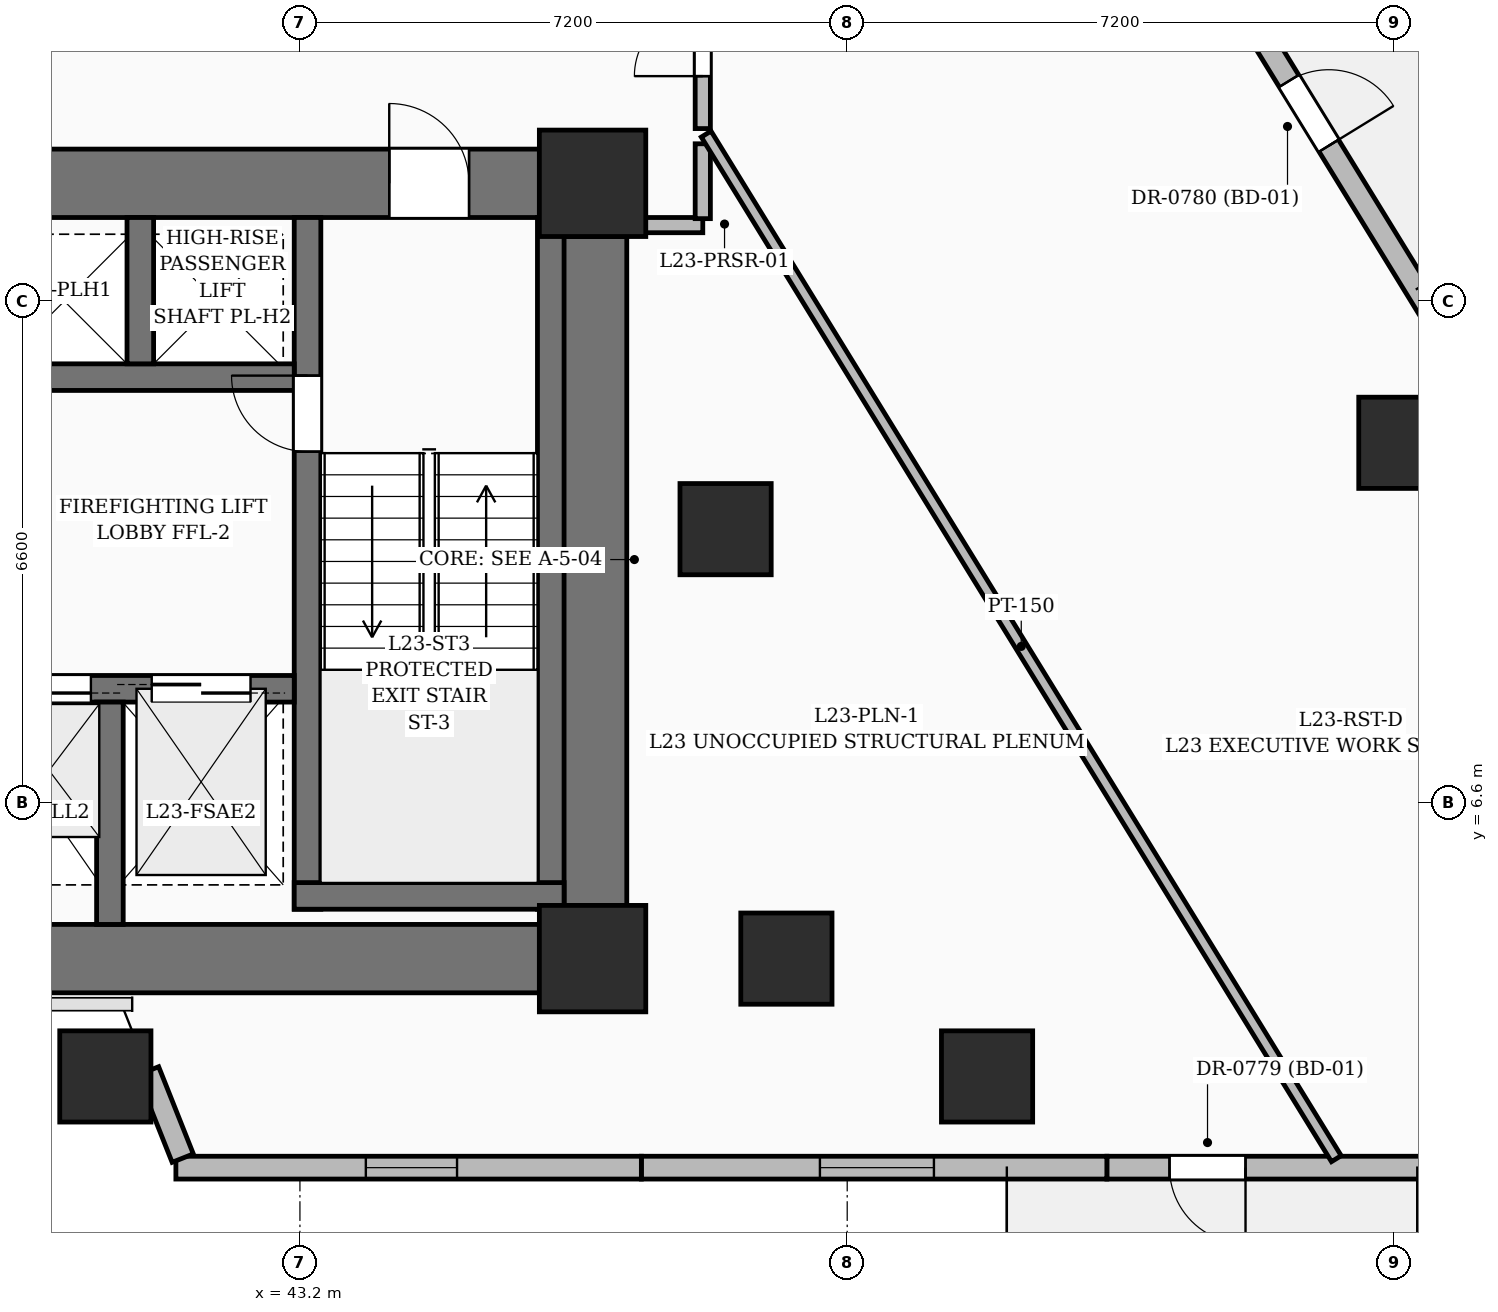
"""IFC4 building model, lengths in metres.
Left out: names, types, materials, properties, quantities, classifications, styles, units other than length and angle.
Written with IfcOpenShell. Run it as: python <this file> out.ifc"""

import sys

from ifc_helpers import new_model, si_unit, direction, frame, frame_2d, origin, origin_2d, place, context, subcontext, project, spatial, rectangle, extrude, element, fill, save


model = new_model("IFC4")
c1 = context("Model", 3, precision=1e-05, world=origin(), true_north=direction((0.0, 1.0)))
c2 = subcontext(c1, "Body", "Model", "MODEL_VIEW")
j1 = project(units=[si_unit("LENGTHUNIT", "METRE"), si_unit("PLANEANGLEUNIT", "RADIAN")], contexts=[c1])
p1 = place(None, origin())
s1 = spatial("IfcSite", under=j1, at=p1, CompositionType="ELEMENT")
p2 = place(p1, origin())
s2 = spatial("IfcBuilding", under=s1, at=p2, CompositionType="ELEMENT")
p3 = place(p2, frame((0.0, 0.0, 93.0)))
s3 = spatial("IfcBuildingStorey", under=s2, at=p3, CompositionType="ELEMENT", Elevation=93.0)
for number, where, z_axis, x_axis in (
    (1, (47.05, 4.55, 0.0), (0.0, 0.0, 1.0), (1.0, 0.0, 0.0)),
    (2, (47.05, 14.75, 0.0), (0.0, 0.0, 1.0), (1.0, 0.0, 0.0)),
):
    element("IfcColumn", number, at=place(p3, frame(where, z_axis=z_axis, x_axis=x_axis)), inside=s3, PredefinedType="COLUMN", context=c2, shape_type="SweptSolid", body=[
        extrude(rectangle(XDim=1.4, YDim=1.4, at=origin_2d()), origin(), (0.0, 0.0, 1.0), 3.6),
    ])
for number, where, z_axis, x_axis in (
    (3, (49.6, 4.55, 0.0), (0.0, 0.0, 1.0), (1.0, 0.0, 0.0)),
    (4, (48.8, 10.2, 0.0), (0.0, 0.0, 1.0), (1.0, 0.0, 0.0)),
):
    element("IfcColumn", number, at=place(p3, frame(where, z_axis=z_axis, x_axis=x_axis)), inside=s3, PredefinedType="COLUMN", context=c2, shape_type="SweptSolid", body=[
        extrude(rectangle(XDim=1.2, YDim=1.2, at=origin_2d()), origin(), (0.0, 0.0, 1.0), 3.6),
    ])
p4 = place(p3, frame((35.85, 4.55, 0.0), z_axis=(0.0, 0.0, 1.0), x_axis=(1.0, 0.0, 0.0)))
e5 = element("IfcWall", 5, at=p4, inside=s3, PredefinedType="SHEAR", context=c2, shape_type="SweptSolid", body=[
    extrude(rectangle(XDim=10.5, YDim=0.9, at=frame_2d((5.25, 0.0))), origin(), (0.0, 0.0, 1.0), 3.6),
])
p5 = place(p3, frame((35.85, 14.75, 0.0), z_axis=(0.0, 0.0, 1.0), x_axis=(1.0, 0.0, 0.0)))
e6 = element("IfcWall", 6, at=p5, inside=s3, PredefinedType="SHEAR", context=c2, shape_type="SweptSolid", body=[
    extrude(rectangle(XDim=10.5, YDim=0.9, at=frame_2d((5.25, 0.0))), origin(), (0.0, 0.0, 1.0), 3.6),
])
p6 = place(p5, frame((0.925, 0.0, 0.0)))
e7 = element("IfcOpeningElement", 7, at=p6, cuts=e6, PredefinedType="OPENING", context=c2, shape_type="SweptSolid", body=[
    extrude(rectangle(XDim=1.05, YDim=2.15, at=frame_2d((0.525, 1.075))), frame((0.0, 0.46, 0.0), z_axis=(0.0, -1.0, 0.0), x_axis=(1.0, 0.0, 0.0)), (0.0, 0.0, 1.0), 0.92),
])
p7 = place(p5, frame((8.525, 0.0, 0.0)))
e8 = element("IfcOpeningElement", 8, at=p7, cuts=e6, PredefinedType="OPENING", context=c2, shape_type="SweptSolid", body=[
    extrude(rectangle(XDim=1.05, YDim=2.15, at=frame_2d((0.525, 1.075))), frame((0.0, 0.46, 0.0), z_axis=(0.0, -1.0, 0.0), x_axis=(1.0, 0.0, 0.0)), (0.0, 0.0, 1.0), 0.92),
])
p8 = place(p3, frame((47.05, 5.25, 0.0), z_axis=(0.0, 0.0, 1.0), x_axis=(0.0, 1.0, 0.0)))
e9 = element("IfcWall", 9, at=p8, inside=s3, PredefinedType="SHEAR", context=c2, shape_type="SweptSolid", body=[
    extrude(rectangle(XDim=8.8, YDim=0.9, at=frame_2d((4.4, 0.0))), origin(), (0.0, 0.0, 1.0), 3.6),
])
p9 = place(p3, frame((43.3, 5.2, 0.0), z_axis=(0.0, 0.0, 1.0), x_axis=(0.0, 1.0, 0.0)))
e10 = element("IfcWall", 10, at=p9, inside=s3, PredefinedType="SOLIDWALL", context=c2, shape_type="SweptSolid", body=[
    extrude(rectangle(XDim=9.1, YDim=0.35, at=frame_2d((4.55, 0.0))), origin(), (0.0, 0.0, 1.0), 3.6),
])
p10 = place(p9, frame((6.02, 0.0, 0.0)))
e11 = element("IfcOpeningElement", 11, at=p10, cuts=e10, PredefinedType="OPENING", context=c2, shape_type="SweptSolid", body=[
    extrude(rectangle(XDim=1.0, YDim=2.15, at=frame_2d((0.5, 1.075))), frame((0.0, 0.185, 0.0), z_axis=(0.0, -1.0, 0.0), x_axis=(1.0, 0.0, 0.0)), (0.0, 0.0, 1.0), 0.37),
])
p11 = place(p3, frame((46.5, 5.2, 0.0), z_axis=(0.0, 0.0, 1.0), x_axis=(0.0, 1.0, 0.0)))
e12 = element("IfcWall", 12, at=p11, inside=s3, PredefinedType="SOLIDWALL", context=c2, shape_type="SweptSolid", body=[
    extrude(rectangle(XDim=9.1, YDim=0.35, at=frame_2d((4.55, 0.0))), origin(), (0.0, 0.0, 1.0), 3.6),
])
p12 = place(p3, frame((43.125, 5.375, 0.0), z_axis=(0.0, 0.0, 1.0), x_axis=(1.0, 0.0, 0.0)))
e13 = element("IfcWall", 13, at=p12, inside=s3, PredefinedType="SOLIDWALL", context=c2, shape_type="SweptSolid", body=[
    extrude(rectangle(XDim=3.55, YDim=0.35, at=frame_2d((1.775, 0.0))), origin(), (0.0, 0.0, 1.0), 3.6),
])
p13 = place(p3, frame((39.075, 8.1, 0.0), z_axis=(0.0, 0.0, 1.0), x_axis=(1.0, 0.0, 0.0)))
e14 = element("IfcWall", 14, at=p13, inside=s3, PredefinedType="SOLIDWALL", context=c2, shape_type="SweptSolid", body=[
    extrude(rectangle(XDim=4.05, YDim=0.35, at=frame_2d((2.025, 0.0))), origin(), (0.0, 0.0, 1.0), 3.6),
])
p14 = place(p13, frame((2.175, 0.0, 0.0)))
e15 = element("IfcOpeningElement", 15, at=p14, cuts=e14, PredefinedType="OPENING", context=c2, shape_type="SweptSolid", body=[
    extrude(rectangle(XDim=1.3, YDim=2.25, at=frame_2d((0.65, 1.125))), frame((0.0, 0.185, 0.0), z_axis=(0.0, -1.0, 0.0), x_axis=(1.0, 0.0, 0.0)), (0.0, 0.0, 1.0), 0.37),
])
p15 = place(p13, frame((0.275, 0.0, 0.0)))
e16 = element("IfcOpeningElement", 16, at=p15, cuts=e14, PredefinedType="OPENING", context=c2, shape_type="SweptSolid", body=[
    extrude(rectangle(XDim=1.1, YDim=2.2, at=frame_2d((0.55, 1.1))), frame((0.0, 0.185, 0.0), z_axis=(0.0, -1.0, 0.0), x_axis=(1.0, 0.0, 0.0)), (0.0, 0.0, 1.0), 0.37),
])
p16 = place(p3, frame((40.7, 5.0, 0.0), z_axis=(0.0, 0.0, 1.0), x_axis=(0.0, 1.0, 0.0)))
e17 = element("IfcWall", 17, at=p16, inside=s3, PredefinedType="SOLIDWALL", context=c2, shape_type="SweptSolid", body=[
    extrude(rectangle(XDim=2.925, YDim=0.35, at=frame_2d((1.462, 0.0))), origin(), (0.0, 0.0, 1.0), 3.6),
])
p17 = place(p3, frame((39.075, 12.2, 0.0), z_axis=(0.0, 0.0, 1.0), x_axis=(1.0, 0.0, 0.0)))
e18 = element("IfcWall", 18, at=p17, inside=s3, PredefinedType="SOLIDWALL", context=c2, shape_type="SweptSolid", body=[
    extrude(rectangle(XDim=4.05, YDim=0.35, at=frame_2d((2.025, 0.0))), origin(), (0.0, 0.0, 1.0), 3.6),
])
p18 = place(p3, frame((41.1, 12.375, 0.0), z_axis=(0.0, 0.0, 1.0), x_axis=(0.0, 1.0, 0.0)))
e19 = element("IfcWall", 19, at=p18, inside=s3, PredefinedType="SOLIDWALL", context=c2, shape_type="SweptSolid", body=[
    extrude(rectangle(XDim=1.925, YDim=0.35, at=frame_2d((0.962, 0.0))), origin(), (0.0, 0.0, 1.0), 3.6),
])
for number, where, z_axis, x_axis in (
    (20, (40.64, 3.0, 0.0), (0.0, 0.0, 1.0), (1.0, 0.0, 0.0)),
    (21, (52.24, 3.0, 0.0), (0.0, 0.0, 1.0), (1.0, 0.0, 0.0)),
    (22, (57.73, 11.336, 0.0), (0.0, 0.0, 1.0), (1.0, 0.0, 0.0)),
):
    element("IfcColumn", number, at=place(p3, frame(where, z_axis=z_axis, x_axis=x_axis)), inside=s3, PredefinedType="COLUMN", context=c2, shape_type="SweptSolid", body=[
        extrude(rectangle(XDim=1.2, YDim=1.2, at=origin_2d()), origin(), (0.0, 0.0, 1.0), 3.6),
    ])
p19 = place(p3, frame((54.041, 19.629, 0.0), z_axis=(0.0, 0.0, 1.0), x_axis=(0.523661280051, -0.851926560083, 0.0)))
e23 = element("IfcWall", 23, at=p19, inside=s3, PredefinedType="SOLIDWALL", context=c2, shape_type="SweptSolid", body=[
    extrude(rectangle(XDim=7.934, YDim=0.3, at=frame_2d((3.967, 0.0))), origin(), (0.0, 0.0, 1.0), 3.35),
])
p20 = place(p19, frame((4.146, 0.0, 0.0)))
e24 = element("IfcOpeningElement", 24, at=p20, cuts=e23, PredefinedType="OPENING", context=c2, shape_type="SweptSolid", body=[
    extrude(rectangle(XDim=1.0, YDim=2.2, at=frame_2d((0.5, 1.1))), frame((0.0, 0.16, 0.0), z_axis=(0.0, -1.0, 0.0), x_axis=(1.0, 0.0, 0.0)), (0.0, 0.0, 1.0), 0.32),
])
p21 = place(p3, frame((59.34, 1.8, 0.0), z_axis=(0.0, 0.0, 1.0), x_axis=(-1.0, 0.0, 0.0)))
e25 = element("IfcWall", 25, at=p21, inside=s3, PredefinedType="SOLIDWALL", context=c2, shape_type="SweptSolid", body=[
    extrude(rectangle(XDim=5.524, YDim=0.3, at=frame_2d((2.762, 0.0))), origin(), (0.0, 0.0, 1.0), 3.35),
])
p22 = place(p21, frame((3.7, 0.0, 0.0)))
e26 = element("IfcOpeningElement", 26, at=p22, cuts=e25, PredefinedType="OPENING", context=c2, shape_type="SweptSolid", body=[
    extrude(rectangle(XDim=1.0, YDim=2.2, at=frame_2d((0.5, 1.1))), frame((0.0, 0.16, 0.0), z_axis=(0.0, -1.0, 0.0), x_axis=(1.0, 0.0, 0.0)), (0.0, 0.0, 1.0), 0.32),
])
p23 = place(p3, frame((53.816, 1.8, 0.0), z_axis=(0.0, 0.0, 1.0), x_axis=(-1.0, 0.0, 0.0)))
e27 = element("IfcWall", 27, at=p23, inside=s3, PredefinedType="SOLIDWALL", context=c2, shape_type="SweptSolid", body=[
    extrude(rectangle(XDim=6.124, YDim=0.3, at=frame_2d((3.062, 0.0))), origin(), (0.0, 0.0, 1.0), 3.35),
])
p24 = place(p23, frame((2.275, 0.0, 0.6)))
e28 = element("IfcOpeningElement", 28, at=p24, cuts=e27, PredefinedType="OPENING", context=c2, shape_type="SweptSolid", body=[
    extrude(rectangle(XDim=1.5, YDim=2.1, at=frame_2d((0.75, 1.05))), frame((0.0, 0.16, 0.0), z_axis=(0.0, -1.0, 0.0), x_axis=(1.0, 0.0, 0.0)), (0.0, 0.0, 1.0), 0.32),
])
p25 = place(p3, frame((47.692, 1.8, 0.0), z_axis=(0.0, 0.0, 1.0), x_axis=(-1.0, 0.0, 0.0)))
e29 = element("IfcWall", 29, at=p25, inside=s3, PredefinedType="SOLIDWALL", context=c2, shape_type="SweptSolid", body=[
    extrude(rectangle(XDim=6.124, YDim=0.3, at=frame_2d((3.062, 0.0))), origin(), (0.0, 0.0, 1.0), 3.35),
])
p26 = place(p25, frame((2.425, 0.0, 0.8)))
e30 = element("IfcOpeningElement", 30, at=p26, cuts=e29, PredefinedType="OPENING", context=c2, shape_type="SweptSolid", body=[
    extrude(rectangle(XDim=1.2, YDim=1.8, at=frame_2d((0.6, 0.9))), frame((0.0, 0.16, 0.0), z_axis=(0.0, -1.0, 0.0), x_axis=(1.0, 0.0, 0.0)), (0.0, 0.0, 1.0), 0.32),
])
p27 = place(p3, frame((41.658, 1.925, 0.0), z_axis=(0.0, 0.0, 1.0), x_axis=(-0.369583004586, 0.929197719929, 0.0)))
e31 = element("IfcWall", 31, at=p27, inside=s3, PredefinedType="SOLIDWALL", context=c2, shape_type="SweptSolid", body=[
    extrude(rectangle(XDim=1.235, YDim=0.3, at=frame_2d((0.617, 0.0))), origin(), (0.0, 0.0, 1.0), 2.375),
])
p28 = place(p3, frame((47.5, 14.2, 0.0), z_axis=(0.0, 0.0, 1.0), x_axis=(1.0, 0.0, 0.0)))
e32 = element("IfcWall", 32, at=p28, inside=s3, PredefinedType="PARTITIONING", context=c2, shape_type="SweptSolid", body=[
    extrude(rectangle(XDim=1.0, YDim=0.2, at=frame_2d((0.5, 0.0))), origin(), (0.0, 0.0, 1.0), 3.35),
])
p29 = place(p3, frame((48.5, 14.285, 0.0), z_axis=(0.0, 0.0, 1.0), x_axis=(0.0, 1.0, 0.0)))
e33 = element("IfcWall", 33, at=p29, inside=s3, PredefinedType="PARTITIONING", context=c2, shape_type="SweptSolid", body=[
    extrude(rectangle(XDim=0.985, YDim=0.2, at=frame_2d((0.493, 0.0))), origin(), (0.0, 0.0, 1.0), 3.35),
])
p30 = place(p3, frame((48.5, 15.47, 0.0), z_axis=(0.0, 0.0, 1.0), x_axis=(0.0, 1.0, 0.0)))
e34 = element("IfcWall", 34, at=p30, inside=s3, PredefinedType="PARTITIONING", context=c2, shape_type="SweptSolid", body=[
    extrude(rectangle(XDim=2.28, YDim=0.2, at=frame_2d((1.14, 0.0))), origin(), (0.0, 0.0, 1.0), 2.345),
])
p31 = place(p30, frame((0.69, 0.0, 0.0)))
e35 = element("IfcOpeningElement", 35, at=p31, cuts=e34, PredefinedType="OPENING", context=c2, shape_type="SweptSolid", body=[
    extrude(rectangle(XDim=0.9, YDim=2.1, at=frame_2d((0.45, 1.05))), frame((0.0, 0.11, 0.0), z_axis=(0.0, -1.0, 0.0), x_axis=(1.0, 0.0, 0.0)), (0.0, 0.0, 1.0), 0.22),
])
p32 = place(p3, frame((56.835, 1.918, 0.0), z_axis=(0.0, 0.0, 1.0), x_axis=(-0.52387102705, 0.851797597447, 0.0)))
e36 = element("IfcWall", 36, at=p32, inside=s3, PredefinedType="PARTITIONING", context=c2, shape_type="SweptSolid", body=[
    extrude(rectangle(XDim=15.825, YDim=0.15, at=frame_2d((7.913, 0.0))), origin(), (0.0, 0.0, 1.0), 2.345),
])
p33 = place(p20, origin())
e37 = element("IfcDoor", 37, at=p33, inside=s3, OperationType="SINGLE_SWING_RIGHT", PredefinedType="DOOR", context=c2, shape_type="SweptSolid", body=[
    extrude(rectangle(XDim=1.0, YDim=2.2, at=frame_2d((0.5, 1.1))), frame((0.0, 0.025, 0.0), z_axis=(0.0, -1.0, 0.0), x_axis=(1.0, 0.0, 0.0)), (0.0, 0.0, 1.0), 0.05),
])
fill(e24, e37)
p34 = place(p22, origin())
e38 = element("IfcDoor", 38, at=p34, inside=s3, OperationType="SINGLE_SWING_LEFT", PredefinedType="DOOR", context=c2, shape_type="SweptSolid", body=[
    extrude(rectangle(XDim=1.0, YDim=2.2, at=frame_2d((0.5, 1.1))), frame((0.0, 0.025, 0.0), z_axis=(0.0, -1.0, 0.0), x_axis=(1.0, 0.0, 0.0)), (0.0, 0.0, 1.0), 0.05),
])
fill(e26, e38)
p35 = place(p24, origin())
e39 = element("IfcWindow", 39, at=p35, inside=s3, PartitioningType="SINGLE_PANEL", PredefinedType="WINDOW", context=c2, shape_type="SweptSolid", body=[
    extrude(rectangle(XDim=1.5, YDim=2.1, at=frame_2d((0.75, 1.05))), frame((0.0, 0.03, 0.0), z_axis=(0.0, -1.0, 0.0), x_axis=(1.0, 0.0, 0.0)), (0.0, 0.0, 1.0), 0.06),
])
fill(e28, e39)
p36 = place(p26, origin())
e40 = element("IfcWindow", 40, at=p36, inside=s3, PartitioningType="SINGLE_PANEL", PredefinedType="WINDOW", context=c2, shape_type="SweptSolid", body=[
    extrude(rectangle(XDim=1.2, YDim=1.8, at=frame_2d((0.6, 0.9))), frame((0.0, 0.03, 0.0), z_axis=(0.0, -1.0, 0.0), x_axis=(1.0, 0.0, 0.0)), (0.0, 0.0, 1.0), 0.06),
])
fill(e30, e40)
p37 = place(p7, origin())
e41 = element("IfcDoor", 41, at=p37, inside=s3, OperationType="SINGLE_SWING_LEFT", PredefinedType="DOOR", context=c2, shape_type="SweptSolid", body=[
    extrude(rectangle(XDim=1.05, YDim=2.15, at=frame_2d((0.525, 1.075))), frame((0.0, 0.025, 0.0), z_axis=(0.0, -1.0, 0.0), x_axis=(1.0, 0.0, 0.0)), (0.0, 0.0, 1.0), 0.05),
])
fill(e8, e41)
p38 = place(p10, origin())
e42 = element("IfcDoor", 42, at=p38, inside=s3, OperationType="SINGLE_SWING_RIGHT", PredefinedType="DOOR", context=c2, shape_type="SweptSolid", body=[
    extrude(rectangle(XDim=1.0, YDim=2.15, at=frame_2d((0.5, 1.075))), frame((0.0, 0.025, 0.0), z_axis=(0.0, -1.0, 0.0), x_axis=(1.0, 0.0, 0.0)), (0.0, 0.0, 1.0), 0.05),
])
fill(e11, e42)
p39 = place(p14, origin())
e43 = element("IfcDoor", 43, at=p39, inside=s3, OperationType="DOUBLE_DOOR_SLIDING", PredefinedType="DOOR", context=c2, shape_type="SweptSolid", body=[
    extrude(rectangle(XDim=1.3, YDim=2.25, at=frame_2d((0.65, 1.125))), frame((0.0, 0.025, 0.0), z_axis=(0.0, -1.0, 0.0), x_axis=(1.0, 0.0, 0.0)), (0.0, 0.0, 1.0), 0.05),
])
fill(e15, e43)
p40 = place(p15, origin())
e44 = element("IfcDoor", 44, at=p40, inside=s3, OperationType="DOUBLE_DOOR_SLIDING", PredefinedType="DOOR", context=c2, shape_type="SweptSolid", body=[
    extrude(rectangle(XDim=1.1, YDim=2.2, at=frame_2d((0.55, 1.1))), frame((0.0, 0.025, 0.0), z_axis=(0.0, -1.0, 0.0), x_axis=(1.0, 0.0, 0.0)), (0.0, 0.0, 1.0), 0.05),
])
fill(e16, e44)
p41 = place(p31, origin())
e45 = element("IfcDoor", 45, at=p41, inside=s3, OperationType="SINGLE_SWING_LEFT", PredefinedType="DOOR", context=c2, shape_type="SweptSolid", body=[
    extrude(rectangle(XDim=0.9, YDim=2.1, at=frame_2d((0.45, 1.05))), frame((0.0, 0.025, 0.0), z_axis=(0.0, -1.0, 0.0), x_axis=(1.0, 0.0, 0.0)), (0.0, 0.0, 1.0), 0.05),
])
fill(e35, e45)
save(model, sys.argv[1])
